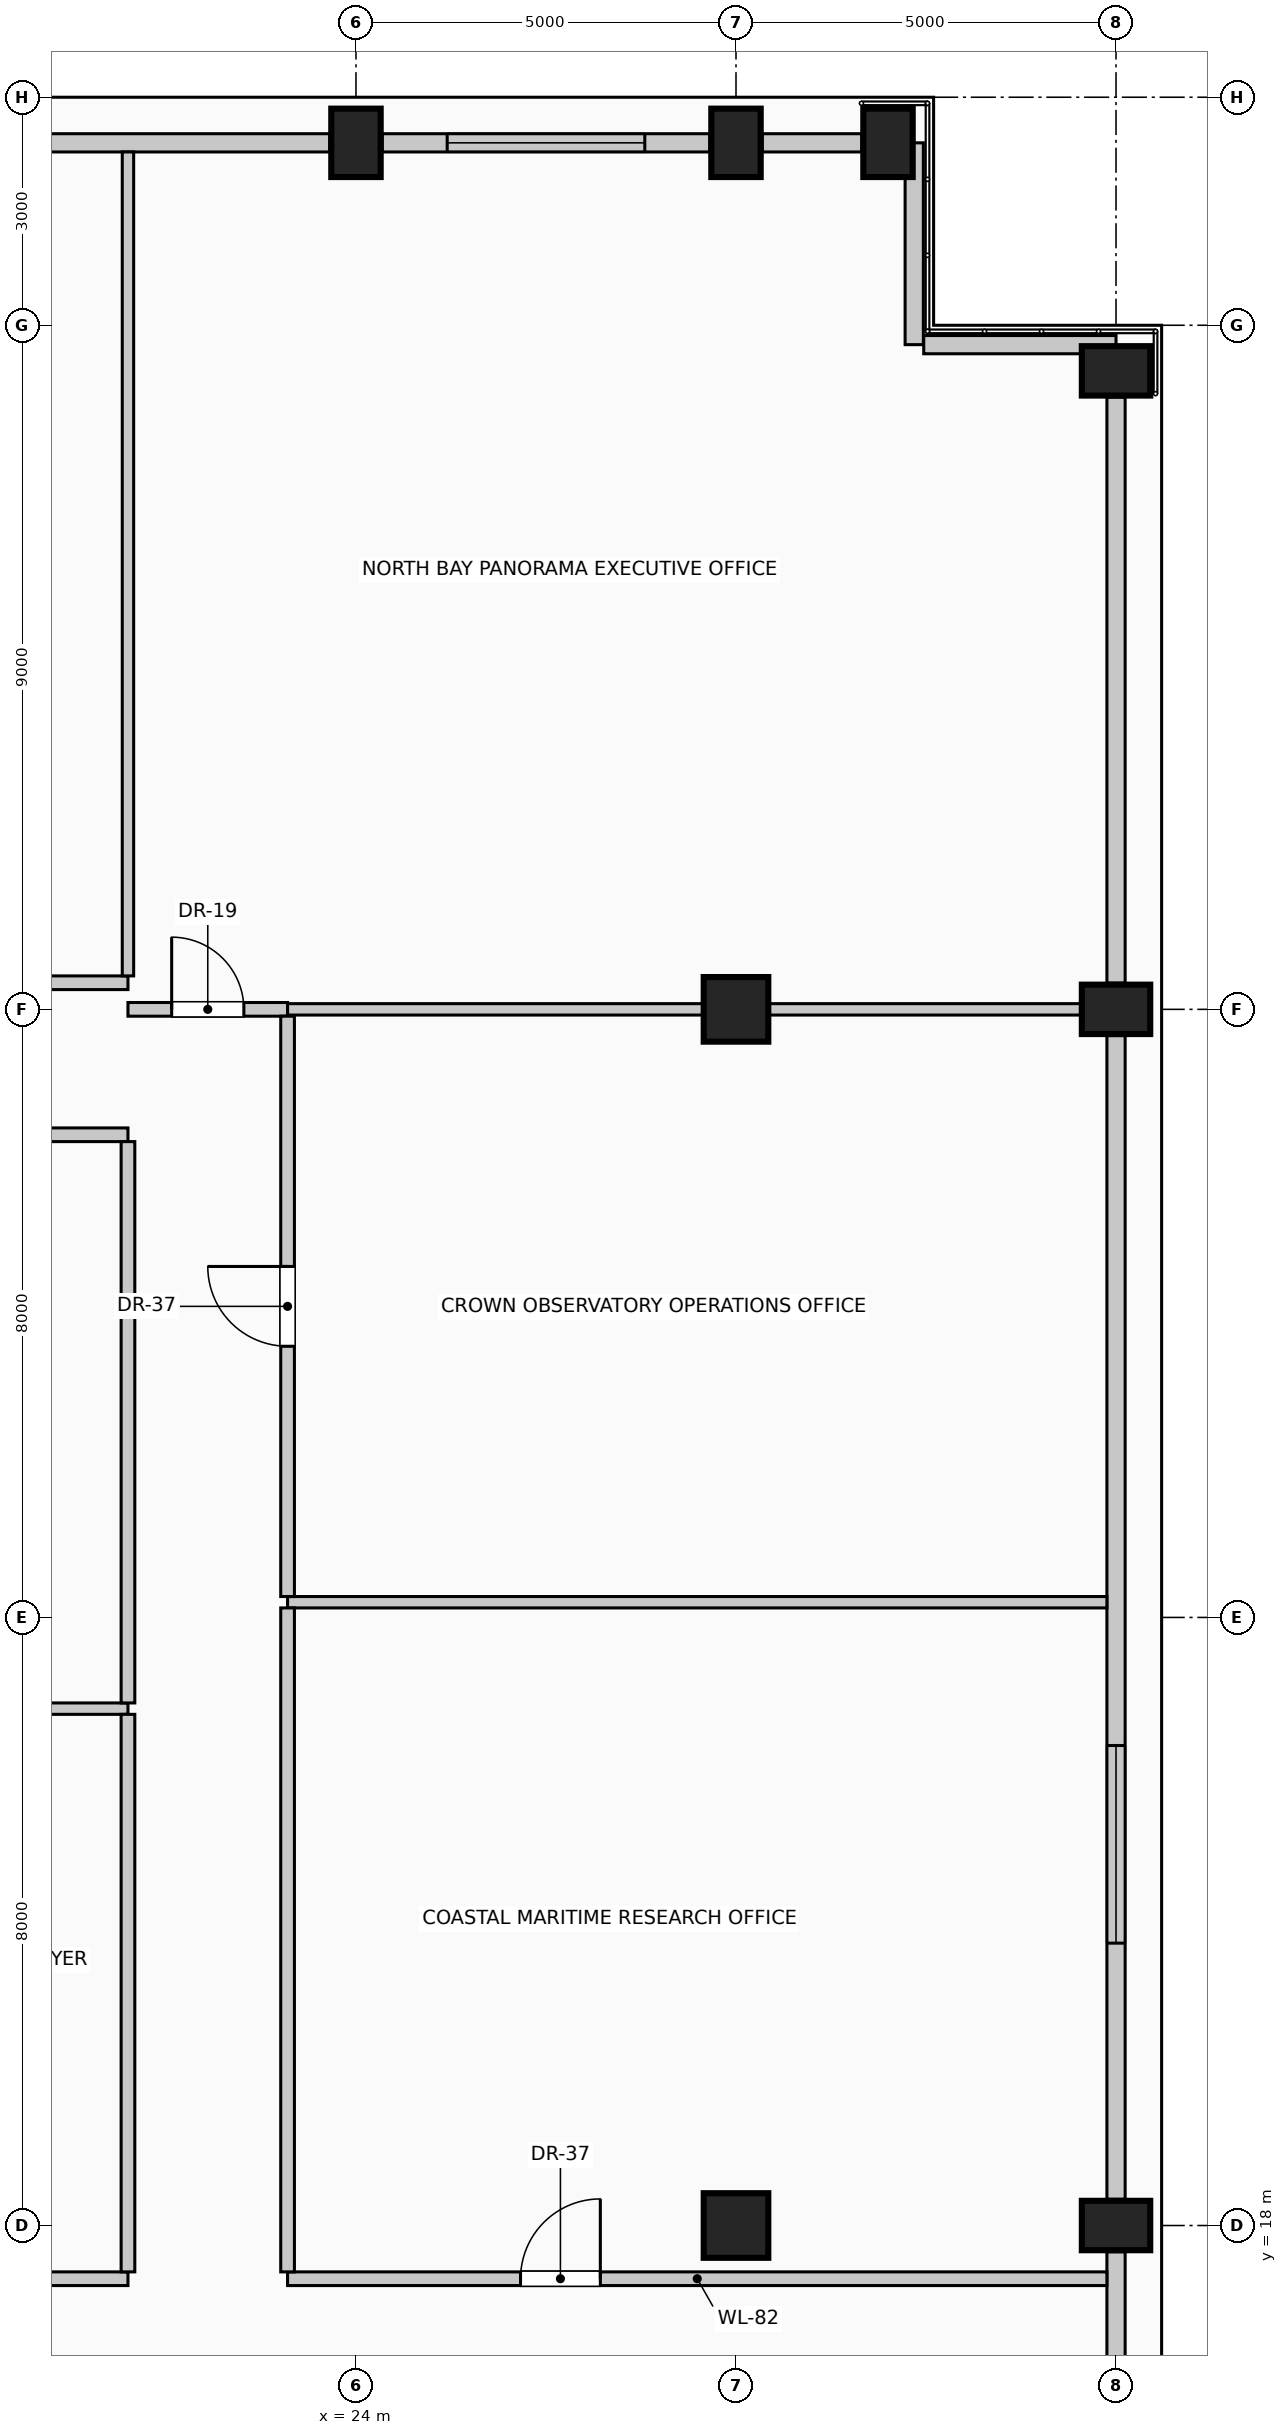
"""IFC4 building model, lengths in metres.
Left out: names, types, materials, properties, quantities, classifications, styles, units other than length and angle.
Written with IfcOpenShell. Run it as: python <this file> out.ifc"""

import sys

from ifc_helpers import new_model, si_unit, direction, frame, frame_2d, origin, origin_2d, place, context, subcontext, project, spatial, rectangle, circle, extrude, element, fill, save


model = new_model("IFC4")
c1 = context("Model", 3, precision=1e-05, world=origin(), true_north=direction((0.0, 1.0)))
c2 = subcontext(c1, "Body", "Model", "MODEL_VIEW")
j1 = project(units=[si_unit("LENGTHUNIT", "METRE"), si_unit("PLANEANGLEUNIT", "RADIAN")], contexts=[c1])
p1 = place(None, origin())
s1 = spatial("IfcSite", under=j1, at=p1, CompositionType="ELEMENT")
p2 = place(p1, origin())
s2 = spatial("IfcBuilding", under=s1, at=p2, CompositionType="ELEMENT")
p3 = place(p2, frame((0.0, 0.0, 313.0)))
s3 = spatial("IfcBuildingStorey", under=s2, at=p3, CompositionType="ELEMENT", Elevation=313.0)
for number, where, z_axis, x_axis in (
    (1, (24.0, 45.4, 0.0), (0.0, 0.0, 1.0), (1.0, 0.0, 0.0)),
    (2, (29.0, 45.4, 0.0), (0.0, 0.0, 1.0), (1.0, 0.0, 0.0)),
    (3, (31.0, 45.4, 0.0), (0.0, 0.0, 1.0), (1.0, 0.0, 0.0)),
    (4, (34.0, 18.0, 0.0), (0.0, 0.0, 1.0), (0.0, 1.0, 0.0)),
    (5, (34.0, 34.0, 0.0), (0.0, 0.0, 1.0), (0.0, 1.0, 0.0)),
    (6, (34.0, 42.4, 0.0), (0.0, 0.0, 1.0), (0.0, 1.0, 0.0)),
):
    element("IfcColumn", number, at=place(p3, frame(where, z_axis=z_axis, x_axis=x_axis)), inside=s3, PredefinedType="COLUMN", context=c2, shape_type="SweptSolid", body=[
        extrude(rectangle(XDim=0.65, YDim=0.9, at=origin_2d()), origin(), (0.0, 0.0, 1.0), 4.8),
    ])
for number, where, z_axis, x_axis in (
    (7, (29.0, 18.0, 0.0), (0.0, 0.0, 1.0), (1.0, 0.0, 0.0)),
    (8, (29.0, 34.0, 0.0), (0.0, 0.0, 1.0), (1.0, 0.0, 0.0)),
):
    element("IfcColumn", number, at=place(p3, frame(where, z_axis=z_axis, x_axis=x_axis)), inside=s3, PredefinedType="COLUMN", context=c2, shape_type="SweptSolid", body=[
        extrude(circle(Radius=0.425, at=origin_2d()), origin(), (0.0, 0.0, 1.0), 4.8),
    ])
p4 = place(p3, frame((16.745, 45.4, 0.0), z_axis=(0.0, 0.0, 1.0), x_axis=(1.0, 0.0, 0.0)))
e9 = element("IfcWall", 9, at=p4, inside=s3, PredefinedType="SOLIDWALL", context=c2, shape_type="SweptSolid", body=[
    extrude(rectangle(XDim=6.91, YDim=0.24, at=frame_2d((3.455, 0.0))), origin(), (0.0, 0.0, 1.0), 2.86),
])
p5 = place(p4, frame((0.57, 0.0, 0.35)))
e10 = element("IfcOpeningElement", 10, at=p5, cuts=e9, PredefinedType="OPENING", context=c2, shape_type="SweptSolid", body=[
    extrude(rectangle(XDim=2.6, YDim=2.4, at=frame_2d((1.3, 1.2))), frame((0.0, 0.13, 0.0), z_axis=(0.0, -1.0, 0.0), x_axis=(1.0, 0.0, 0.0)), (0.0, 0.0, 1.0), 0.26),
])
p6 = place(p3, frame((24.345, 45.4, 0.0), z_axis=(0.0, 0.0, 1.0), x_axis=(1.0, 0.0, 0.0)))
e11 = element("IfcWall", 11, at=p6, inside=s3, PredefinedType="SOLIDWALL", context=c2, shape_type="SweptSolid", body=[
    extrude(rectangle(XDim=4.31, YDim=0.24, at=frame_2d((2.155, 0.0))), origin(), (0.0, 0.0, 1.0), 2.86),
])
p7 = place(p6, frame((0.855, 0.0, 0.35)))
e12 = element("IfcOpeningElement", 12, at=p7, cuts=e11, PredefinedType="OPENING", context=c2, shape_type="SweptSolid", body=[
    extrude(rectangle(XDim=2.6, YDim=2.4, at=frame_2d((1.3, 1.2))), frame((0.0, 0.13, 0.0), z_axis=(0.0, -1.0, 0.0), x_axis=(1.0, 0.0, 0.0)), (0.0, 0.0, 1.0), 0.26),
])
p8 = place(p3, frame((29.345, 45.4, 0.0), z_axis=(0.0, 0.0, 1.0), x_axis=(1.0, 0.0, 0.0)))
e13 = element("IfcWall", 13, at=p8, inside=s3, PredefinedType="SOLIDWALL", context=c2, shape_type="SweptSolid", body=[
    extrude(rectangle(XDim=1.31, YDim=0.24, at=frame_2d((0.655, 0.0))), origin(), (0.0, 0.0, 1.0), 2.86),
])
p9 = place(p3, frame((34.0, 17.655, 0.0), z_axis=(0.0, 0.0, 1.0), x_axis=(0.0, -1.0, 0.0)))
e14 = element("IfcWall", 14, at=p9, inside=s3, PredefinedType="SOLIDWALL", context=c2, shape_type="SweptSolid", body=[
    extrude(rectangle(XDim=13.71, YDim=0.24, at=frame_2d((6.855, 0.0))), origin(), (0.0, 0.0, 1.0), 3.78),
])
p10 = place(p9, frame((2.837, 0.0, 0.35)))
e15 = element("IfcOpeningElement", 15, at=p10, cuts=e14, PredefinedType="OPENING", context=c2, shape_type="SweptSolid", body=[
    extrude(rectangle(XDim=2.6, YDim=2.4, at=frame_2d((1.3, 1.2))), frame((0.0, 0.13, 0.0), z_axis=(0.0, -1.0, 0.0), x_axis=(1.0, 0.0, 0.0)), (0.0, 0.0, 1.0), 0.26),
])
p11 = place(p9, frame((8.273, 0.0, 0.35)))
e16 = element("IfcOpeningElement", 16, at=p11, cuts=e14, PredefinedType="OPENING", context=c2, shape_type="SweptSolid", body=[
    extrude(rectangle(XDim=2.6, YDim=2.4, at=frame_2d((1.3, 1.2))), frame((0.0, 0.13, 0.0), z_axis=(0.0, -1.0, 0.0), x_axis=(1.0, 0.0, 0.0)), (0.0, 0.0, 1.0), 0.26),
])
p12 = place(p3, frame((34.0, 33.655, 0.0), z_axis=(0.0, 0.0, 1.0), x_axis=(0.0, -1.0, 0.0)))
e17 = element("IfcWall", 17, at=p12, inside=s3, PredefinedType="SOLIDWALL", context=c2, shape_type="SweptSolid", body=[
    extrude(rectangle(XDim=15.31, YDim=0.24, at=frame_2d((7.655, 0.0))), origin(), (0.0, 0.0, 1.0), 3.78),
])
p13 = place(p12, frame((9.34, 0.0, 0.35)))
e18 = element("IfcOpeningElement", 18, at=p13, cuts=e17, PredefinedType="OPENING", context=c2, shape_type="SweptSolid", body=[
    extrude(rectangle(XDim=2.6, YDim=2.4, at=frame_2d((1.3, 1.2))), frame((0.0, 0.13, 0.0), z_axis=(0.0, -1.0, 0.0), x_axis=(1.0, 0.0, 0.0)), (0.0, 0.0, 1.0), 0.26),
])
p14 = place(p3, frame((34.0, 42.055, 0.0), z_axis=(0.0, 0.0, 1.0), x_axis=(0.0, -1.0, 0.0)))
e19 = element("IfcWall", 19, at=p14, inside=s3, PredefinedType="SOLIDWALL", context=c2, shape_type="SweptSolid", body=[
    extrude(rectangle(XDim=7.71, YDim=0.24, at=frame_2d((3.855, 0.0))), origin(), (0.0, 0.0, 1.0), 3.78),
])
p15 = place(p3, frame((31.345, 45.4, 0.0), z_axis=(0.0, 0.0, 1.0), x_axis=(0.0, -1.0, 0.0)))
e20 = element("IfcWall", 20, at=p15, inside=s3, PredefinedType="SOLIDWALL", context=c2, shape_type="SweptSolid", body=[
    extrude(rectangle(XDim=2.655, YDim=0.24, at=frame_2d((1.327, 0.0))), origin(), (0.0, 0.0, 1.0), 2.93),
])
p16 = place(p3, frame((31.47, 42.745, 0.0), z_axis=(0.0, 0.0, 1.0), x_axis=(1.0, 0.0, 0.0)))
e21 = element("IfcWall", 21, at=p16, inside=s3, PredefinedType="SOLIDWALL", context=c2, shape_type="SweptSolid", body=[
    extrude(rectangle(XDim=2.53, YDim=0.24, at=frame_2d((1.265, 0.0))), origin(), (0.0, 0.0, 1.0), 2.93),
])
p17 = place(p3, frame((15.85, 17.3, 0.0), z_axis=(0.0, 0.0, 1.0), x_axis=(1.0, 0.0, 0.0)))
e22 = element("IfcWall", 22, at=p17, inside=s3, PredefinedType="PARTITIONING", context=c2, shape_type="SweptSolid", body=[
    extrude(rectangle(XDim=5.15, YDim=0.18, at=frame_2d((2.575, 0.0))), origin(), (0.0, 0.0, 1.0), 2.855),
])
p18 = place(p17, frame((2.28, 0.0, 0.0)))
e23 = element("IfcOpeningElement", 23, at=p18, cuts=e22, PredefinedType="OPENING", context=c2, shape_type="SweptSolid", body=[
    extrude(rectangle(XDim=0.95, YDim=2.15, at=frame_2d((0.475, 1.075))), frame((0.0, 0.1, 0.0), z_axis=(0.0, -1.0, 0.0), x_axis=(1.0, 0.0, 0.0)), (0.0, 0.0, 1.0), 0.2),
])
p19 = place(p3, frame((23.1, 17.3, 0.0), z_axis=(0.0, 0.0, 1.0), x_axis=(1.0, 0.0, 0.0)))
e24 = element("IfcWall", 24, at=p19, inside=s3, PredefinedType="PARTITIONING", context=c2, shape_type="SweptSolid", body=[
    extrude(rectangle(XDim=10.78, YDim=0.18, at=frame_2d((5.39, 0.0))), origin(), (0.0, 0.0, 1.0), 2.855),
])
p20 = place(p19, frame((3.065, 0.0, 0.0)))
e25 = element("IfcOpeningElement", 25, at=p20, cuts=e24, PredefinedType="OPENING", context=c2, shape_type="SweptSolid", body=[
    extrude(rectangle(XDim=1.05, YDim=2.15, at=frame_2d((0.525, 1.075))), frame((0.0, 0.1, 0.0), z_axis=(0.0, -1.0, 0.0), x_axis=(1.0, 0.0, 0.0)), (0.0, 0.0, 1.0), 0.2),
])
p21 = place(p3, frame((15.85, 24.8, 0.0), z_axis=(0.0, 0.0, 1.0), x_axis=(1.0, 0.0, 0.0)))
e26 = element("IfcWall", 26, at=p21, inside=s3, PredefinedType="PARTITIONING", context=c2, shape_type="SweptSolid", body=[
    extrude(rectangle(XDim=5.15, YDim=0.15, at=frame_2d((2.575, 0.0))), origin(), (0.0, 0.0, 1.0), 4.46),
])
p22 = place(p3, frame((23.1, 26.2, 0.0), z_axis=(0.0, 0.0, 1.0), x_axis=(1.0, 0.0, 0.0)))
e27 = element("IfcWall", 27, at=p22, inside=s3, PredefinedType="PARTITIONING", context=c2, shape_type="SweptSolid", body=[
    extrude(rectangle(XDim=10.78, YDim=0.15, at=frame_2d((5.39, 0.0))), origin(), (0.0, 0.0, 1.0), 4.46),
])
p23 = place(p3, frame((15.85, 32.35, 0.0), z_axis=(0.0, 0.0, 1.0), x_axis=(1.0, 0.0, 0.0)))
e28 = element("IfcWall", 28, at=p23, inside=s3, PredefinedType="PARTITIONING", context=c2, shape_type="SweptSolid", body=[
    extrude(rectangle(XDim=5.15, YDim=0.18, at=frame_2d((2.575, 0.0))), origin(), (0.0, 0.0, 1.0), 4.46),
])
p24 = place(p3, frame((21.0, 34.0, 0.0), z_axis=(0.0, 0.0, 1.0), x_axis=(1.0, 0.0, 0.0)))
e29 = element("IfcWall", 29, at=p24, inside=s3, PredefinedType="PARTITIONING", context=c2, shape_type="SweptSolid", body=[
    extrude(rectangle(XDim=2.1, YDim=0.18, at=frame_2d((1.05, 0.0))), origin(), (0.0, 0.0, 1.0), 2.855),
])
p25 = place(p24, frame((0.575, 0.0, 0.0)))
e30 = element("IfcOpeningElement", 30, at=p25, cuts=e29, PredefinedType="OPENING", context=c2, shape_type="SweptSolid", body=[
    extrude(rectangle(XDim=0.95, YDim=2.15, at=frame_2d((0.475, 1.075))), frame((0.0, 0.1, 0.0), z_axis=(0.0, -1.0, 0.0), x_axis=(1.0, 0.0, 0.0)), (0.0, 0.0, 1.0), 0.2),
])
p26 = place(p3, frame((23.1, 34.0, 0.0), z_axis=(0.0, 0.0, 1.0), x_axis=(1.0, 0.0, 0.0)))
e31 = element("IfcWall", 31, at=p26, inside=s3, PredefinedType="PARTITIONING", context=c2, shape_type="SweptSolid", body=[
    extrude(rectangle(XDim=5.475, YDim=0.15, at=frame_2d((2.737, 0.0))), origin(), (0.0, 0.0, 1.0), 2.855),
])
p27 = place(p3, frame((29.425, 34.0, 0.0), z_axis=(0.0, 0.0, 1.0), x_axis=(1.0, 0.0, 0.0)))
e32 = element("IfcWall", 32, at=p27, inside=s3, PredefinedType="PARTITIONING", context=c2, shape_type="SweptSolid", body=[
    extrude(rectangle(XDim=4.125, YDim=0.15, at=frame_2d((2.062, 0.0))), origin(), (0.0, 0.0, 1.0), 2.855),
])
p28 = place(p3, frame((17.0, 34.35, 0.0), z_axis=(0.0, 0.0, 1.0), x_axis=(1.0, 0.0, 0.0)))
e33 = element("IfcWall", 33, at=p28, inside=s3, PredefinedType="PARTITIONING", context=c2, shape_type="SweptSolid", body=[
    extrude(rectangle(XDim=4.0, YDim=0.18, at=frame_2d((2.0, 0.0))), origin(), (0.0, 0.0, 1.0), 2.855),
])
p29 = place(p28, frame((1.56, 0.0, 0.0)))
e34 = element("IfcOpeningElement", 34, at=p29, cuts=e33, PredefinedType="OPENING", context=c2, shape_type="SweptSolid", body=[
    extrude(rectangle(XDim=0.88, YDim=2.1, at=frame_2d((0.44, 1.05))), frame((0.0, 0.1, 0.0), z_axis=(0.0, -1.0, 0.0), x_axis=(1.0, 0.0, 0.0)), (0.0, 0.0, 1.0), 0.2),
])
p30 = place(p3, frame((21.0, 17.39, 0.0), z_axis=(0.0, 0.0, 1.0), x_axis=(0.0, 1.0, 0.0)))
e35 = element("IfcWall", 35, at=p30, inside=s3, PredefinedType="PARTITIONING", context=c2, shape_type="SweptSolid", body=[
    extrude(rectangle(XDim=7.335, YDim=0.18, at=frame_2d((3.667, 0.0))), origin(), (0.0, 0.0, 1.0), 4.46),
])
p31 = place(p3, frame((21.0, 24.875, 0.0), z_axis=(0.0, 0.0, 1.0), x_axis=(0.0, 1.0, 0.0)))
e36 = element("IfcWall", 36, at=p31, inside=s3, PredefinedType="PARTITIONING", context=c2, shape_type="SweptSolid", body=[
    extrude(rectangle(XDim=7.385, YDim=0.18, at=frame_2d((3.692, 0.0))), origin(), (0.0, 0.0, 1.0), 4.46),
])
p32 = place(p3, frame((21.0, 34.44, 0.0), z_axis=(0.0, 0.0, 1.0), x_axis=(0.0, 1.0, 0.0)))
e37 = element("IfcWall", 37, at=p32, inside=s3, PredefinedType="PARTITIONING", context=c2, shape_type="SweptSolid", body=[
    extrude(rectangle(XDim=10.84, YDim=0.15, at=frame_2d((5.42, 0.0))), origin(), (0.0, 0.0, 1.0), 4.46),
])
p33 = place(p3, frame((23.1, 17.39, 0.0), z_axis=(0.0, 0.0, 1.0), x_axis=(0.0, 1.0, 0.0)))
e38 = element("IfcWall", 38, at=p33, inside=s3, PredefinedType="PARTITIONING", context=c2, shape_type="SweptSolid", body=[
    extrude(rectangle(XDim=8.735, YDim=0.18, at=frame_2d((4.368, 0.0))), origin(), (0.0, 0.0, 1.0), 4.46),
])
p34 = place(p3, frame((23.1, 26.275, 0.0), z_axis=(0.0, 0.0, 1.0), x_axis=(0.0, 1.0, 0.0)))
e39 = element("IfcWall", 39, at=p34, inside=s3, PredefinedType="PARTITIONING", context=c2, shape_type="SweptSolid", body=[
    extrude(rectangle(XDim=7.635, YDim=0.18, at=frame_2d((3.817, 0.0))), origin(), (0.0, 0.0, 1.0), 4.46),
])
p35 = place(p34, frame((3.292, 0.0, 0.0)))
e40 = element("IfcOpeningElement", 40, at=p35, cuts=e39, PredefinedType="OPENING", context=c2, shape_type="SweptSolid", body=[
    extrude(rectangle(XDim=1.05, YDim=2.15, at=frame_2d((0.525, 1.075))), frame((0.0, 0.1, 0.0), z_axis=(0.0, -1.0, 0.0), x_axis=(1.0, 0.0, 0.0)), (0.0, 0.0, 1.0), 0.2),
])
p36 = place(p7, origin())
e41 = element("IfcWindow", 41, at=p36, inside=s3, PartitioningType="SINGLE_PANEL", PredefinedType="WINDOW", context=c2, shape_type="SweptSolid", body=[
    extrude(rectangle(XDim=2.6, YDim=2.4, at=frame_2d((1.3, 1.2))), frame((0.0, 0.03, 0.0), z_axis=(0.0, -1.0, 0.0), x_axis=(1.0, 0.0, 0.0)), (0.0, 0.0, 1.0), 0.06),
])
fill(e12, e41)
p37 = place(p13, origin())
e42 = element("IfcWindow", 42, at=p37, inside=s3, PartitioningType="SINGLE_PANEL", PredefinedType="WINDOW", context=c2, shape_type="SweptSolid", body=[
    extrude(rectangle(XDim=2.6, YDim=2.4, at=frame_2d((1.3, 1.2))), frame((0.0, 0.03, 0.0), z_axis=(0.0, -1.0, 0.0), x_axis=(1.0, 0.0, 0.0)), (0.0, 0.0, 1.0), 0.06),
])
fill(e18, e42)
p38 = place(p20, origin())
e43 = element("IfcDoor", 43, at=p38, inside=s3, OperationType="SINGLE_SWING_RIGHT", PredefinedType="DOOR", context=c2, shape_type="SweptSolid", body=[
    extrude(rectangle(XDim=1.05, YDim=2.15, at=frame_2d((0.525, 1.075))), frame((0.0, 0.025, 0.0), z_axis=(0.0, -1.0, 0.0), x_axis=(1.0, 0.0, 0.0)), (0.0, 0.0, 1.0), 0.05),
])
fill(e25, e43)
p39 = place(p25, origin())
e44 = element("IfcDoor", 44, at=p39, inside=s3, OperationType="SINGLE_SWING_LEFT", PredefinedType="DOOR", context=c2, shape_type="SweptSolid", body=[
    extrude(rectangle(XDim=0.95, YDim=2.15, at=frame_2d((0.475, 1.075))), frame((0.0, 0.025, 0.0), z_axis=(0.0, -1.0, 0.0), x_axis=(1.0, 0.0, 0.0)), (0.0, 0.0, 1.0), 0.05),
])
fill(e30, e44)
p40 = place(p35, origin())
e45 = element("IfcDoor", 45, at=p40, inside=s3, OperationType="SINGLE_SWING_RIGHT", PredefinedType="DOOR", context=c2, shape_type="SweptSolid", body=[
    extrude(rectangle(XDim=1.05, YDim=2.15, at=frame_2d((0.525, 1.075))), frame((0.0, 0.025, 0.0), z_axis=(0.0, -1.0, 0.0), x_axis=(1.0, 0.0, 0.0)), (0.0, 0.0, 1.0), 0.05),
])
fill(e40, e45)
save(model, sys.argv[1])
